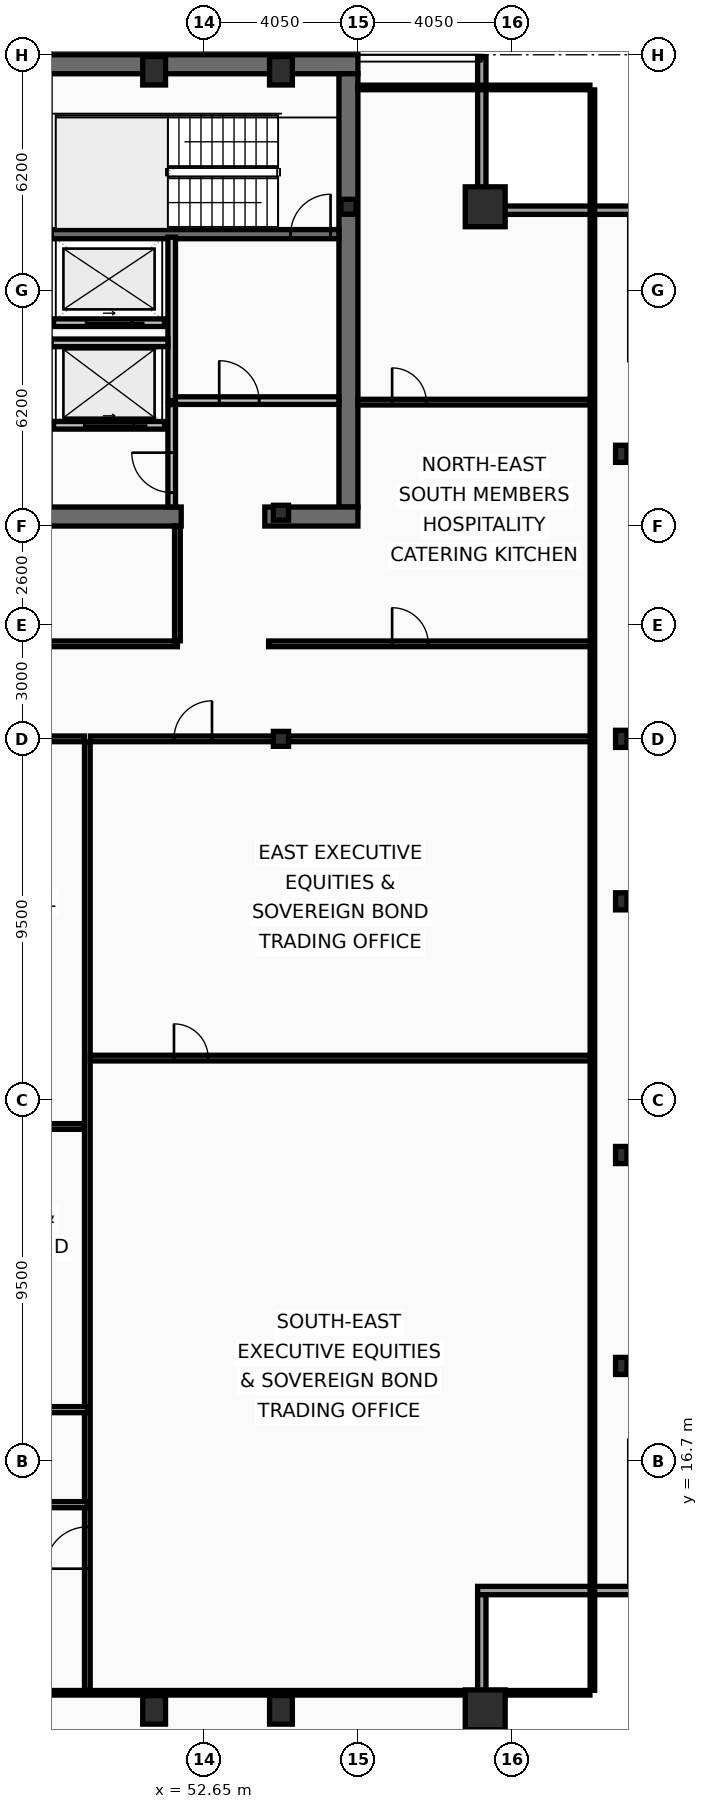
"""IFC4 building model, lengths in metres.
Left out: names, types, materials, properties, quantities, classifications, styles, units other than length and angle.
Written with IfcOpenShell. Run it as: python <this file> out.ifc"""

import sys

from ifc_helpers import new_model, si_unit, direction, frame, frame_2d, origin, origin_2d, place, context, subcontext, project, spatial, rectangle, hollow_rectangle, i_section, extrude, element, fill, save


model = new_model("IFC4")
c1 = context("Model", 3, precision=1e-05, world=origin(), true_north=direction((0.0, 1.0)))
c2 = subcontext(c1, "Body", "Model", "MODEL_VIEW")
j1 = project(units=[si_unit("LENGTHUNIT", "METRE"), si_unit("PLANEANGLEUNIT", "RADIAN")], contexts=[c1])
p1 = place(None, origin())
s1 = spatial("IfcSite", under=j1, at=p1, CompositionType="ELEMENT")
p2 = place(p1, origin())
s2 = spatial("IfcBuilding", under=s1, at=p2, CompositionType="ELEMENT")
p3 = place(p2, frame((0.0, 0.0, 280.6)))
s3 = spatial("IfcBuildingStorey", under=s2, at=p3, CompositionType="ELEMENT", Elevation=280.6)
p4 = place(p3, frame((16.2, 53.45, 0.0), z_axis=(0.0, 0.0, 1.0), x_axis=(1.0, 0.0, 0.0)))
e1 = element("IfcWall", 1, at=p4, inside=s3, PredefinedType="SHEAR", context=c2, shape_type="SweptSolid", body=[
    extrude(rectangle(XDim=40.5, YDim=0.5, at=frame_2d((20.25, 0.0))), origin(), (0.0, 0.0, 1.0), 3.44),
])
p5 = place(p3, frame((56.45, 53.2, 0.0), z_axis=(0.0, 0.0, 1.0), x_axis=(0.0, -1.0, 0.0)))
e2 = element("IfcWall", 2, at=p5, inside=s3, PredefinedType="SHEAR", context=c2, shape_type="SweptSolid", body=[
    extrude(rectangle(XDim=11.4, YDim=0.5, at=frame_2d((5.7, 0.0))), origin(), (0.0, 0.0, 1.0), 3.44),
])
p6 = place(p3, frame((52.05, 41.55, 0.0), z_axis=(0.0, 0.0, 1.0), x_axis=(-1.0, 0.0, 0.0)))
e3 = element("IfcWall", 3, at=p6, inside=s3, PredefinedType="SHEAR", context=c2, shape_type="SweptSolid", body=[
    extrude(rectangle(XDim=11.3, YDim=0.5, at=frame_2d((5.65, 0.0))), origin(), (0.0, 0.0, 1.0), 3.44),
])
p7 = place(p3, frame((56.7, 41.55, 0.0), z_axis=(0.0, 0.0, 1.0), x_axis=(-1.0, 0.0, 0.0)))
e4 = element("IfcWall", 4, at=p7, inside=s3, PredefinedType="SHEAR", context=c2, shape_type="SweptSolid", body=[
    extrude(rectangle(XDim=2.45, YDim=0.5, at=frame_2d((1.225, 0.0))), origin(), (0.0, 0.0, 1.0), 3.44),
])
p8 = place(p3, frame((48.63, 48.98, 0.0), z_axis=(0.0, 0.0, 1.0), x_axis=(1.0, 0.0, 0.0)))
e5 = element("IfcWall", 5, at=p8, inside=s3, PredefinedType="SHEAR", context=c2, shape_type="SweptSolid", body=[
    extrude(rectangle(XDim=7.57, YDim=0.24, at=frame_2d((3.785, 0.0))), origin(), (0.0, 0.0, 1.0), 3.44),
])
p9 = place(p8, frame((6.3, 0.0, 0.0)))
e6 = element("IfcOpeningElement", 6, at=p9, cuts=e5, PredefinedType="OPENING", context=c2, shape_type="SweptSolid", body=[
    extrude(rectangle(XDim=1.05, YDim=2.15, at=frame_2d((0.525, 1.075))), frame((0.0, 0.13, 0.0), z_axis=(0.0, -1.0, 0.0), x_axis=(1.0, 0.0, 0.0)), (0.0, 0.0, 1.0), 0.26),
])
for number, where, z_axis, x_axis in (
    (7, (60.05, 10.15, 0.0), (0.0, 0.0, 1.0), (1.0, 0.0, 0.0)),
    (8, (60.05, 49.7, 0.0), (0.0, 0.0, 1.0), (1.0, 0.0, 0.0)),
):
    element("IfcColumn", number, at=place(p3, frame(where, z_axis=z_axis, x_axis=x_axis)), inside=s3, PredefinedType="COLUMN", context=c2, shape_type="SweptSolid", body=[
        extrude(hollow_rectangle(XDim=1.05, YDim=1.05, WallThickness=0.055, at=origin_2d()), origin(), (0.0, 0.0, 1.0), 3.6),
    ])
for number, where, z_axis, x_axis in (
    (9, (51.337, 10.15, 0.0), (0.0, 0.0, 1.0), (1.0, 0.0, 0.0)),
    (10, (54.675, 10.15, 0.0), (0.0, 0.0, 1.0), (1.0, 0.0, 0.0)),
    (11, (51.337, 53.28, 0.0), (0.0, 0.0, 1.0), (1.0, 0.0, 0.0)),
    (12, (54.675, 53.28, 0.0), (0.0, 0.0, 1.0), (1.0, 0.0, 0.0)),
):
    element("IfcColumn", number, at=place(p3, frame(where, z_axis=z_axis, x_axis=x_axis)), inside=s3, PredefinedType="COLUMN", context=c2, shape_type="SweptSolid", body=[
        extrude(hollow_rectangle(XDim=0.6, YDim=0.75, WallThickness=0.045, at=origin_2d()), origin(), (0.0, 0.0, 1.0), 3.6),
    ])
for number, where, z_axis, x_axis in (
    (13, (63.63, 19.2, 0.0), (0.0, 0.0, 1.0), (1.0, 0.0, 0.0)),
    (14, (63.63, 24.75, 0.0), (0.0, 0.0, 1.0), (1.0, 0.0, 0.0)),
    (15, (63.63, 31.425, 0.0), (0.0, 0.0, 1.0), (1.0, 0.0, 0.0)),
    (16, (63.63, 35.7, 0.0), (0.0, 0.0, 1.0), (1.0, 0.0, 0.0)),
    (17, (63.63, 43.2, 0.0), (0.0, 0.0, 1.0), (1.0, 0.0, 0.0)),
):
    element("IfcColumn", number, at=place(p3, frame(where, z_axis=z_axis, x_axis=x_axis)), inside=s3, PredefinedType="COLUMN", context=c2, shape_type="SweptSolid", body=[
        extrude(i_section(OverallWidth=0.3, OverallDepth=0.45, WebThickness=0.014, FlangeThickness=0.026, at=origin_2d()), origin(), (0.0, 0.0, 1.0), 3.6),
    ])
for number, where, z_axis, x_axis in (
    (18, (56.45, 49.7, 0.0), (0.0, 0.0, 1.0), (1.0, 0.0, 0.0)),
    (19, (54.675, 35.7, 0.0), (0.0, 0.0, 1.0), (1.0, 0.0, 0.0)),
    (20, (54.675, 41.65, 0.0), (0.0, 0.0, 1.0), (1.0, 0.0, 0.0)),
):
    element("IfcColumn", number, at=place(p3, frame(where, z_axis=z_axis, x_axis=x_axis)), inside=s3, PredefinedType="COLUMN", context=c2, shape_type="SweptSolid", body=[
        extrude(i_section(OverallWidth=0.399, OverallDepth=0.393, WebThickness=0.023, FlangeThickness=0.037, at=origin_2d()), origin(), (0.0, 0.0, 1.0), 3.6),
    ])
p10 = place(p3, frame((59.96, 53.63, 0.0), z_axis=(0.0, 0.0, 1.0), x_axis=(0.0, -1.0, 0.0)))
e21 = element("IfcWall", 21, at=p10, inside=s3, PredefinedType="SOLIDWALL", context=c2, shape_type="SweptSolid", body=[
    extrude(rectangle(XDim=3.91, YDim=0.22, at=frame_2d((1.955, 0.0))), origin(), (0.0, 0.0, 1.0), 2.88),
])
for number, where, z_axis, x_axis in (
    (22, (59.85, 49.61, 0.0), (0.0, 0.0, 1.0), (1.0, 0.0, 0.0)),
    (23, (64.07, 13.29, 0.0), (0.0, 0.0, 1.0), (-1.0, 0.0, 0.0)),
):
    element("IfcWall", number, at=place(p3, frame(where, z_axis=z_axis, x_axis=x_axis)), inside=s3, PredefinedType="SOLIDWALL", context=c2, shape_type="SweptSolid", body=[
        extrude(rectangle(XDim=4.22, YDim=0.22, at=frame_2d((2.11, 0.0))), origin(), (0.0, 0.0, 1.0), 2.88),
    ])
p11 = place(p3, frame((59.96, 13.18, 0.0), z_axis=(0.0, 0.0, 1.0), x_axis=(0.0, -1.0, 0.0)))
e24 = element("IfcWall", 24, at=p11, inside=s3, PredefinedType="SOLIDWALL", context=c2, shape_type="SweptSolid", body=[
    extrude(rectangle(XDim=3.91, YDim=0.22, at=frame_2d((1.955, 0.0))), origin(), (0.0, 0.0, 1.0), 2.88),
])
p12 = place(p3, frame((51.61, 43.95, 0.0), z_axis=(0.0, 0.0, 1.0), x_axis=(-1.0, 0.0, 0.0)))
e25 = element("IfcWall", 25, at=p12, inside=s3, PredefinedType="PARTITIONING", context=c2, shape_type="SweptSolid", body=[
    extrude(rectangle(XDim=2.92, YDim=0.2, at=frame_2d((1.46, 0.0))), origin(), (0.0, 0.0, 1.0), 3.44),
])
p13 = place(p12, frame((0.81, 0.0, 0.0)))
e26 = element("IfcOpeningElement", 26, at=p13, cuts=e25, PredefinedType="OPENING", context=c2, shape_type="SweptSolid", body=[
    extrude(rectangle(XDim=1.3, YDim=2.18, at=frame_2d((0.65, 1.09))), frame((0.0, 0.11, 0.0), z_axis=(0.0, -1.0, 0.0), x_axis=(1.0, 0.0, 0.0)), (0.0, 0.0, 1.0), 0.22),
])
p14 = place(p3, frame((51.61, 46.65, 0.0), z_axis=(0.0, 0.0, 1.0), x_axis=(-1.0, 0.0, 0.0)))
e27 = element("IfcWall", 27, at=p14, inside=s3, PredefinedType="PARTITIONING", context=c2, shape_type="SweptSolid", body=[
    extrude(rectangle(XDim=2.92, YDim=0.2, at=frame_2d((1.46, 0.0))), origin(), (0.0, 0.0, 1.0), 3.44),
])
p15 = place(p14, frame((0.86, 0.0, 0.0)))
e28 = element("IfcOpeningElement", 28, at=p15, cuts=e27, PredefinedType="OPENING", context=c2, shape_type="SweptSolid", body=[
    extrude(rectangle(XDim=1.2, YDim=2.18, at=frame_2d((0.6, 1.09))), frame((0.0, 0.11, 0.0), z_axis=(0.0, -1.0, 0.0), x_axis=(1.0, 0.0, 0.0)), (0.0, 0.0, 1.0), 0.22),
])
p16 = place(p3, frame((51.8, 44.6, 0.0), z_axis=(0.0, 0.0, 1.0), x_axis=(0.0, 1.0, 0.0)))
e29 = element("IfcWall", 29, at=p16, inside=s3, PredefinedType="PARTITIONING", context=c2, shape_type="SweptSolid", body=[
    extrude(rectangle(XDim=4.3, YDim=0.2, at=frame_2d((2.15, 0.0))), origin(), (0.0, 0.0, 1.0), 3.44),
])
p17 = place(p3, frame((51.9, 44.6, 0.0), z_axis=(0.0, 0.0, 1.0), x_axis=(1.0, 0.0, 0.0)))
e30 = element("IfcWall", 30, at=p17, inside=s3, PredefinedType="PARTITIONING", context=c2, shape_type="SweptSolid", body=[
    extrude(rectangle(XDim=4.3, YDim=0.2, at=frame_2d((2.15, 0.0))), origin(), (0.0, 0.0, 1.0), 3.44),
])
p18 = place(p17, frame((1.15, 0.0, 0.0)))
e31 = element("IfcOpeningElement", 31, at=p18, cuts=e30, PredefinedType="OPENING", context=c2, shape_type="SweptSolid", body=[
    extrude(rectangle(XDim=1.05, YDim=2.15, at=frame_2d((0.525, 1.075))), frame((0.0, 0.11, 0.0), z_axis=(0.0, -1.0, 0.0), x_axis=(1.0, 0.0, 0.0)), (0.0, 0.0, 1.0), 0.22),
])
p19 = place(p3, frame((48.63, 46.12, 0.0), z_axis=(0.0, 0.0, 1.0), x_axis=(1.0, 0.0, 0.0)))
e32 = element("IfcWall", 32, at=p19, inside=s3, PredefinedType="PARTITIONING", context=c2, shape_type="SweptSolid", body=[
    extrude(rectangle(XDim=3.07, YDim=0.2, at=frame_2d((1.535, 0.0))), origin(), (0.0, 0.0, 1.0), 3.44),
])
p20 = place(p3, frame((51.8, 41.8, 0.0), z_axis=(0.0, 0.0, 1.0), x_axis=(0.0, 1.0, 0.0)))
e33 = element("IfcWall", 33, at=p20, inside=s3, PredefinedType="PARTITIONING", context=c2, shape_type="SweptSolid", body=[
    extrude(rectangle(XDim=2.695, YDim=0.2, at=frame_2d((1.348, 0.0))), origin(), (0.0, 0.0, 1.0), 3.44),
])
p21 = place(p20, frame((0.38, 0.0, 0.0)))
e34 = element("IfcOpeningElement", 34, at=p21, cuts=e33, PredefinedType="OPENING", context=c2, shape_type="SweptSolid", body=[
    extrude(rectangle(XDim=1.05, YDim=2.15, at=frame_2d((0.525, 1.075))), frame((0.0, 0.11, 0.0), z_axis=(0.0, -1.0, 0.0), x_axis=(1.0, 0.0, 0.0)), (0.0, 0.0, 1.0), 0.22),
])
p22 = place(p3, frame((45.55, 38.2, 0.0), z_axis=(0.0, 0.0, 1.0), x_axis=(1.0, 0.0, 0.0)))
e35 = element("IfcWall", 35, at=p22, inside=s3, PredefinedType="PARTITIONING", context=c2, shape_type="SweptSolid", body=[
    extrude(rectangle(XDim=6.4, YDim=0.15, at=frame_2d((3.2, 0.0))), origin(), (0.0, 0.0, 1.0), 2.78),
])
p23 = place(p22, frame((1.1, 0.0, 0.0)))
e36 = element("IfcOpeningElement", 36, at=p23, cuts=e35, PredefinedType="OPENING", context=c2, shape_type="SweptSolid", body=[
    extrude(rectangle(XDim=1.0, YDim=2.05, at=frame_2d((0.5, 1.025))), frame((0.0, 0.085, 0.0), z_axis=(0.0, -1.0, 0.0), x_axis=(1.0, 0.0, 0.0)), (0.0, 0.0, 1.0), 0.17),
])
p24 = place(p3, frame((51.95, 38.28, 0.0), z_axis=(0.0, 0.0, 1.0), x_axis=(0.0, 1.0, 0.0)))
e37 = element("IfcWall", 37, at=p24, inside=s3, PredefinedType="PARTITIONING", context=c2, shape_type="SweptSolid", body=[
    extrude(rectangle(XDim=3.02, YDim=0.15, at=frame_2d((1.51, 0.0))), origin(), (0.0, 0.0, 1.0), 3.44),
])
p25 = place(p3, frame((54.35, 38.2, 0.0), z_axis=(0.0, 0.0, 1.0), x_axis=(1.0, 0.0, 0.0)))
e38 = element("IfcWall", 38, at=p25, inside=s3, PredefinedType="PARTITIONING", context=c2, shape_type="SweptSolid", body=[
    extrude(rectangle(XDim=8.52, YDim=0.15, at=frame_2d((4.26, 0.0))), origin(), (0.0, 0.0, 1.0), 2.78),
])
p26 = place(p25, frame((3.25, 0.0, 0.0)))
e39 = element("IfcOpeningElement", 39, at=p26, cuts=e38, PredefinedType="OPENING", context=c2, shape_type="SweptSolid", body=[
    extrude(rectangle(XDim=0.95, YDim=2.05, at=frame_2d((0.475, 1.025))), frame((0.0, 0.085, 0.0), z_axis=(0.0, -1.0, 0.0), x_axis=(1.0, 0.0, 0.0)), (0.0, 0.0, 1.0), 0.17),
])
p27 = place(p3, frame((56.7, 44.56, 0.0), z_axis=(0.0, 0.0, 1.0), x_axis=(1.0, 0.0, 0.0)))
e40 = element("IfcWall", 40, at=p27, inside=s3, PredefinedType="PARTITIONING", context=c2, shape_type="SweptSolid", body=[
    extrude(rectangle(XDim=6.105, YDim=0.15, at=frame_2d((3.052, 0.0))), origin(), (0.0, 0.0, 1.0), 2.88),
])
p28 = place(p27, frame((0.9, 0.0, 0.0)))
e41 = element("IfcOpeningElement", 41, at=p28, cuts=e40, PredefinedType="OPENING", context=c2, shape_type="SweptSolid", body=[
    extrude(rectangle(XDim=0.9, YDim=2.05, at=frame_2d((0.45, 1.025))), frame((0.0, 0.085, 0.0), z_axis=(0.0, -1.0, 0.0), x_axis=(1.0, 0.0, 0.0)), (0.0, 0.0, 1.0), 0.17),
])
p29 = place(p3, frame((49.58, 10.665, 0.0), z_axis=(0.0, 0.0, 1.0), x_axis=(0.0, 1.0, 0.0)))
e42 = element("IfcWall", 42, at=p29, inside=s3, PredefinedType="PARTITIONING", context=c2, shape_type="SweptSolid", body=[
    extrude(rectangle(XDim=24.955, YDim=0.15, at=frame_2d((12.478, 0.0))), origin(), (0.0, 0.0, 1.0), 3.03),
])
p30 = place(p29, frame((3.2, 0.0, 0.0)))
e43 = element("IfcOpeningElement", 43, at=p30, cuts=e42, PredefinedType="OPENING", context=c2, shape_type="SweptSolid", body=[
    extrude(rectangle(XDim=1.1, YDim=2.1, at=frame_2d((0.55, 1.05))), frame((0.0, 0.085, 0.0), z_axis=(0.0, -1.0, 0.0), x_axis=(1.0, 0.0, 0.0)), (0.0, 0.0, 1.0), 0.17),
])
p31 = place(p3, frame((24.48, 35.7, 0.0), z_axis=(0.0, 0.0, 1.0), x_axis=(1.0, 0.0, 0.0)))
e44 = element("IfcWall", 44, at=p31, inside=s3, PredefinedType="PARTITIONING", context=c2, shape_type="SweptSolid", body=[
    extrude(rectangle(XDim=25.02, YDim=0.15, at=frame_2d((12.51, 0.0))), origin(), (0.0, 0.0, 1.0), 2.78),
])
p32 = place(p3, frame((49.66, 35.7, 0.0), z_axis=(0.0, 0.0, 1.0), x_axis=(1.0, 0.0, 0.0)))
e45 = element("IfcWall", 45, at=p32, inside=s3, PredefinedType="PARTITIONING", context=c2, shape_type="SweptSolid", body=[
    extrude(rectangle(XDim=13.145, YDim=0.15, at=frame_2d((6.573, 0.0))), origin(), (0.0, 0.0, 1.0), 2.78),
])
p33 = place(p32, frame((2.2, 0.0, 0.0)))
e46 = element("IfcOpeningElement", 46, at=p33, cuts=e45, PredefinedType="OPENING", context=c2, shape_type="SweptSolid", body=[
    extrude(rectangle(XDim=1.0, YDim=2.05, at=frame_2d((0.5, 1.025))), frame((0.0, 0.085, 0.0), z_axis=(0.0, -1.0, 0.0), x_axis=(1.0, 0.0, 0.0)), (0.0, 0.0, 1.0), 0.17),
])
p34 = place(p3, frame((49.66, 27.3, 0.0), z_axis=(0.0, 0.0, 1.0), x_axis=(1.0, 0.0, 0.0)))
e47 = element("IfcWall", 47, at=p34, inside=s3, PredefinedType="PARTITIONING", context=c2, shape_type="SweptSolid", body=[
    extrude(rectangle(XDim=13.145, YDim=0.15, at=frame_2d((6.573, 0.0))), origin(), (0.0, 0.0, 1.0), 2.78),
])
p35 = place(p34, frame((2.2, 0.0, 0.0)))
e48 = element("IfcOpeningElement", 48, at=p35, cuts=e47, PredefinedType="OPENING", context=c2, shape_type="SweptSolid", body=[
    extrude(rectangle(XDim=0.9, YDim=2.05, at=frame_2d((0.45, 1.025))), frame((0.0, 0.085, 0.0), z_axis=(0.0, -1.0, 0.0), x_axis=(1.0, 0.0, 0.0)), (0.0, 0.0, 1.0), 0.17),
])
p36 = place(p3, frame((43.956, 18.05, 0.0), z_axis=(0.0, 0.0, 1.0), x_axis=(1.0, 0.0, 0.0)))
e49 = element("IfcWall", 49, at=p36, inside=s3, PredefinedType="PARTITIONING", context=c2, shape_type="SweptSolid", body=[
    extrude(rectangle(XDim=5.624, YDim=0.16, at=frame_2d((2.812, 0.0))), origin(), (0.0, 0.0, 1.0), 2.78),
])
p37 = place(p36, frame((2.612, 0.0, 0.0)))
e50 = element("IfcOpeningElement", 50, at=p37, cuts=e49, PredefinedType="OPENING", context=c2, shape_type="SweptSolid", body=[
    extrude(rectangle(XDim=1.0, YDim=2.05, at=frame_2d((0.5, 1.025))), frame((0.0, 0.09, 0.0), z_axis=(0.0, -1.0, 0.0), x_axis=(1.0, 0.0, 0.0)), (0.0, 0.0, 1.0), 0.18),
])
p38 = place(p3, frame((44.036, 25.501, 0.0), z_axis=(0.0, 0.0, 1.0), x_axis=(1.0, 0.0, 0.0)))
e51 = element("IfcWall", 51, at=p38, inside=s3, PredefinedType="PARTITIONING", context=c2, shape_type="SweptSolid", body=[
    extrude(rectangle(XDim=5.464, YDim=0.15, at=frame_2d((2.732, 0.0))), origin(), (0.0, 0.0, 1.0), 2.78),
])
p39 = place(p38, frame((2.531, 0.0, 0.0)))
e52 = element("IfcOpeningElement", 52, at=p39, cuts=e51, PredefinedType="OPENING", context=c2, shape_type="SweptSolid", body=[
    extrude(rectangle(XDim=0.9, YDim=2.05, at=frame_2d((0.45, 1.025))), frame((0.0, 0.085, 0.0), z_axis=(0.0, -1.0, 0.0), x_axis=(1.0, 0.0, 0.0)), (0.0, 0.0, 1.0), 0.17),
])
p40 = place(p3, frame((36.532, 15.55, 0.0), z_axis=(0.0, 0.0, 1.0), x_axis=(1.0, 0.0, 0.0)))
e53 = element("IfcWall", 53, at=p40, inside=s3, PredefinedType="PARTITIONING", context=c2, shape_type="SweptSolid", body=[
    extrude(rectangle(XDim=13.048, YDim=0.16, at=frame_2d((6.524, 0.0))), origin(), (0.0, 0.0, 1.0), 2.78),
])
p41 = place(p40, frame((5.73, 0.0, 0.0)))
e54 = element("IfcOpeningElement", 54, at=p41, cuts=e53, PredefinedType="OPENING", context=c2, shape_type="SweptSolid", body=[
    extrude(rectangle(XDim=1.0, YDim=2.05, at=frame_2d((0.5, 1.025))), frame((0.0, 0.09, 0.0), z_axis=(0.0, -1.0, 0.0), x_axis=(1.0, 0.0, 0.0)), (0.0, 0.0, 1.0), 0.18),
])
p42 = place(p3, frame((62.87, 10.665, 0.0), z_axis=(0.0, 0.0, 1.0), x_axis=(0.0, 1.0, 0.0)))
e55 = element("IfcWall", 55, at=p42, inside=s3, PredefinedType="PARTITIONING", context=c2, shape_type="SweptSolid", body=[
    extrude(rectangle(XDim=42.11, YDim=0.12, at=frame_2d((21.055, 0.0))), origin(), (0.0, 0.0, 1.0), 2.78),
])
p43 = place(p3, frame((56.7, 52.84, 0.0), z_axis=(0.0, 0.0, 1.0), x_axis=(1.0, 0.0, 0.0)))
e56 = element("IfcWall", 56, at=p43, inside=s3, PredefinedType="PARTITIONING", context=c2, shape_type="SweptSolid", body=[
    extrude(rectangle(XDim=6.105, YDim=0.12, at=frame_2d((3.052, 0.0))), origin(), (0.0, 0.0, 1.0), 3.44),
])
p44 = place(p3, frame((10.095, 10.6, 0.0), z_axis=(0.0, 0.0, 1.0), x_axis=(1.0, 0.0, 0.0)))
e57 = element("IfcWall", 57, at=p44, inside=s3, PredefinedType="PARTITIONING", context=c2, shape_type="SweptSolid", body=[
    extrude(rectangle(XDim=52.71, YDim=0.12, at=frame_2d((26.355, 0.0))), origin(), (0.0, 0.0, 1.0), 2.78),
])
p45 = place(p9, origin())
e58 = element("IfcDoor", 58, at=p45, inside=s3, OperationType="SINGLE_SWING_RIGHT", PredefinedType="DOOR", context=c2, shape_type="SweptSolid", body=[
    extrude(rectangle(XDim=1.05, YDim=2.15, at=frame_2d((0.525, 1.075))), frame((0.0, 0.025, 0.0), z_axis=(0.0, -1.0, 0.0), x_axis=(1.0, 0.0, 0.0)), (0.0, 0.0, 1.0), 0.05),
])
fill(e6, e58)
p46 = place(p13, origin())
e59 = element("IfcDoor", 59, at=p46, inside=s3, OperationType="SLIDING_TO_LEFT", PredefinedType="DOOR", context=c2, shape_type="SweptSolid", body=[
    extrude(rectangle(XDim=1.3, YDim=2.18, at=frame_2d((0.65, 1.09))), frame((0.0, 0.025, 0.0), z_axis=(0.0, -1.0, 0.0), x_axis=(1.0, 0.0, 0.0)), (0.0, 0.0, 1.0), 0.05),
])
fill(e26, e59)
p47 = place(p15, origin())
e60 = element("IfcDoor", 60, at=p47, inside=s3, OperationType="SLIDING_TO_LEFT", PredefinedType="DOOR", context=c2, shape_type="SweptSolid", body=[
    extrude(rectangle(XDim=1.2, YDim=2.18, at=frame_2d((0.6, 1.09))), frame((0.0, 0.025, 0.0), z_axis=(0.0, -1.0, 0.0), x_axis=(1.0, 0.0, 0.0)), (0.0, 0.0, 1.0), 0.05),
])
fill(e28, e60)
p48 = place(p18, origin())
e61 = element("IfcDoor", 61, at=p48, inside=s3, OperationType="SINGLE_SWING_LEFT", PredefinedType="DOOR", context=c2, shape_type="SweptSolid", body=[
    extrude(rectangle(XDim=1.05, YDim=2.15, at=frame_2d((0.525, 1.075))), frame((0.0, 0.025, 0.0), z_axis=(0.0, -1.0, 0.0), x_axis=(1.0, 0.0, 0.0)), (0.0, 0.0, 1.0), 0.05),
])
fill(e31, e61)
p49 = place(p21, origin())
e62 = element("IfcDoor", 62, at=p49, inside=s3, OperationType="SINGLE_SWING_RIGHT", PredefinedType="DOOR", context=c2, shape_type="SweptSolid", body=[
    extrude(rectangle(XDim=1.05, YDim=2.15, at=frame_2d((0.525, 1.075))), frame((0.0, 0.025, 0.0), z_axis=(0.0, -1.0, 0.0), x_axis=(1.0, 0.0, 0.0)), (0.0, 0.0, 1.0), 0.05),
])
fill(e34, e62)
p50 = place(p26, origin())
e63 = element("IfcDoor", 63, at=p50, inside=s3, OperationType="SINGLE_SWING_LEFT", PredefinedType="DOOR", context=c2, shape_type="SweptSolid", body=[
    extrude(rectangle(XDim=0.95, YDim=2.05, at=frame_2d((0.475, 1.025))), frame((0.0, 0.025, 0.0), z_axis=(0.0, -1.0, 0.0), x_axis=(1.0, 0.0, 0.0)), (0.0, 0.0, 1.0), 0.05),
])
fill(e39, e63)
p51 = place(p28, origin())
e64 = element("IfcDoor", 64, at=p51, inside=s3, OperationType="SINGLE_SWING_LEFT", PredefinedType="DOOR", context=c2, shape_type="SweptSolid", body=[
    extrude(rectangle(XDim=0.9, YDim=2.05, at=frame_2d((0.45, 1.025))), frame((0.0, 0.025, 0.0), z_axis=(0.0, -1.0, 0.0), x_axis=(1.0, 0.0, 0.0)), (0.0, 0.0, 1.0), 0.05),
])
fill(e41, e64)
p52 = place(p30, origin())
e65 = element("IfcDoor", 65, at=p52, inside=s3, OperationType="SINGLE_SWING_LEFT", PredefinedType="DOOR", context=c2, shape_type="SweptSolid", body=[
    extrude(rectangle(XDim=1.1, YDim=2.1, at=frame_2d((0.55, 1.05))), frame((0.0, 0.025, 0.0), z_axis=(0.0, -1.0, 0.0), x_axis=(1.0, 0.0, 0.0)), (0.0, 0.0, 1.0), 0.05),
])
fill(e43, e65)
p53 = place(p33, origin())
e66 = element("IfcDoor", 66, at=p53, inside=s3, OperationType="SINGLE_SWING_RIGHT", PredefinedType="DOOR", context=c2, shape_type="SweptSolid", body=[
    extrude(rectangle(XDim=1.0, YDim=2.05, at=frame_2d((0.5, 1.025))), frame((0.0, 0.025, 0.0), z_axis=(0.0, -1.0, 0.0), x_axis=(1.0, 0.0, 0.0)), (0.0, 0.0, 1.0), 0.05),
])
fill(e46, e66)
p54 = place(p35, origin())
e67 = element("IfcDoor", 67, at=p54, inside=s3, OperationType="SINGLE_SWING_LEFT", PredefinedType="DOOR", context=c2, shape_type="SweptSolid", body=[
    extrude(rectangle(XDim=0.9, YDim=2.05, at=frame_2d((0.45, 1.025))), frame((0.0, 0.025, 0.0), z_axis=(0.0, -1.0, 0.0), x_axis=(1.0, 0.0, 0.0)), (0.0, 0.0, 1.0), 0.05),
])
fill(e48, e67)
save(model, sys.argv[1])
